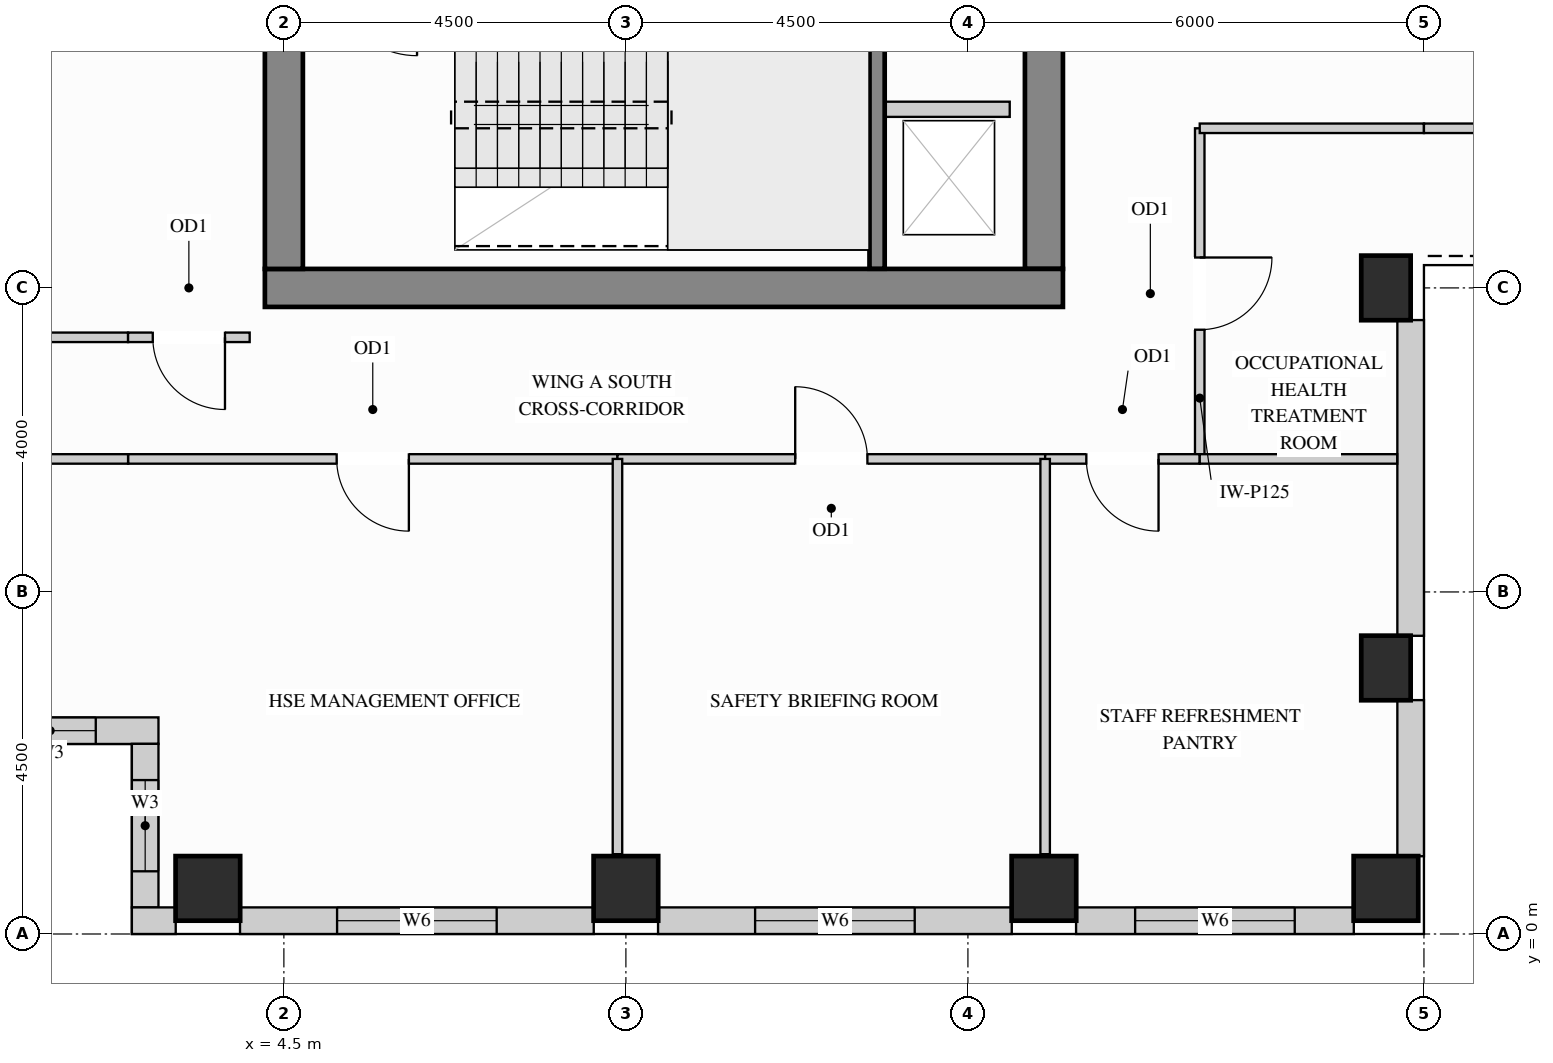
"""IFC4 building model, lengths in metres.
Left out: names, types, materials, properties, quantities, classifications, styles, units other than length and angle.
Written with IfcOpenShell. Run it as: python <this file> out.ifc"""

import sys

from ifc_helpers import new_model, si_unit, direction, frame, frame_2d, origin, origin_2d, place, context, subcontext, project, spatial, rectangle, extrude, source, transform, mapped, element, fill, save


model = new_model("IFC4")
c1 = context("Model", 3, precision=1e-05, world=origin(), true_north=direction((0.0, 1.0)))
c2 = subcontext(c1, "Body", "Model", "MODEL_VIEW")
j1 = project(units=[si_unit("LENGTHUNIT", "METRE"), si_unit("PLANEANGLEUNIT", "RADIAN")], contexts=[c1])
p1 = place(None, origin())
s1 = spatial("IfcSite", under=j1, at=p1, CompositionType="ELEMENT")
p2 = place(p1, origin())
s2 = spatial("IfcBuilding", under=s1, at=p2, CompositionType="ELEMENT")
p3 = place(p2, frame((0.0, 0.0, 248.4)))
s3 = spatial("IfcBuildingStorey", under=s2, at=p3, CompositionType="ELEMENT", Elevation=248.4)
m1 = source(origin(), c2, "Body", "SweptSolid", [
    extrude(rectangle(XDim=0.65, YDim=0.85, at=origin_2d()), origin(), (0.0, 0.0, 1.0), 3.4),
])
for number, where, z_axis, x_axis in (
    (1, (19.0, 3.5, 0.0), (0.0, 0.0, 1.0), (1.0, 0.0, 0.0)),
    (2, (19.0, 8.5, 0.0), (0.0, 0.0, 1.0), (1.0, 0.0, 0.0)),
):
    element("IfcColumn", number, at=place(p3, frame(where, z_axis=z_axis, x_axis=x_axis)), inside=s3, PredefinedType="COLUMN", context=c2, shape_type="MappedRepresentation", body=[
        mapped(m1, transform((0.0, 0.0, 0.0), x_axis=(1.0, 0.0, 0.0), y_axis=(0.0, 1.0, 0.0), z_axis=(0.0, 0.0, 1.0))),
    ])
m2 = source(origin(), c2, "Body", "SweptSolid", [
    extrude(rectangle(XDim=0.85, YDim=0.85, at=origin_2d()), origin(), (0.0, 0.0, 1.0), 3.4),
])
for number, where, z_axis, x_axis in (
    (3, (14.5, 0.6, 0.0), (0.0, 0.0, 1.0), (1.0, 0.0, 0.0)),
    (4, (19.0, 0.6, 0.0), (0.0, 0.0, 1.0), (1.0, 0.0, 0.0)),
    (5, (3.5, 0.6, 0.0), (0.0, 0.0, 1.0), (1.0, 0.0, 0.0)),
    (6, (9.0, 0.6, 0.0), (0.0, 0.0, 1.0), (1.0, 0.0, 0.0)),
):
    element("IfcColumn", number, at=place(p3, frame(where, z_axis=z_axis, x_axis=x_axis)), inside=s3, PredefinedType="COLUMN", context=c2, shape_type="MappedRepresentation", body=[
        mapped(m2, transform((0.0, 0.0, 0.0), x_axis=(1.0, 0.0, 0.0), y_axis=(0.0, 1.0, 0.0), z_axis=(0.0, 0.0, 1.0))),
    ])
m3 = source(origin(), c2, "Body", "SweptSolid", [
    extrude(rectangle(XDim=10.07, YDim=0.5, at=frame_2d((5.035, 0.0))), origin(), (0.0, 0.0, 1.0), 3.4),
])
p4 = place(p3, frame((14.5, 8.75, 0.0), z_axis=(0.0, 0.0, 1.0), x_axis=(0.0, 1.0, 0.0)))
e7 = element("IfcWall", 7, at=p4, inside=s3, PredefinedType="SHEAR", context=c2, shape_type="MappedRepresentation", body=[
    mapped(m3, transform((0.0, 0.0, 0.0), x_axis=(1.0, 0.0, 0.0), y_axis=(0.0, 1.0, 0.0), z_axis=(0.0, 0.0, 1.0))),
])
m4 = source(origin(), c2, "Body", "SweptSolid", [
    extrude(rectangle(XDim=10.5, YDim=0.5, at=frame_2d((5.25, 0.0))), origin(), (0.0, 0.0, 1.0), 3.4),
])
p5 = place(p3, frame((4.25, 8.5, 0.0), z_axis=(0.0, 0.0, 1.0), x_axis=(1.0, 0.0, 0.0)))
e8 = element("IfcWall", 8, at=p5, inside=s3, PredefinedType="SHEAR", context=c2, shape_type="MappedRepresentation", body=[
    mapped(m4, transform((0.0, 0.0, 0.0), x_axis=(1.0, 0.0, 0.0), y_axis=(0.0, 1.0, 0.0), z_axis=(0.0, 0.0, 1.0))),
])
m5 = source(origin(), c2, "Body", "SweptSolid", [
    extrude(rectangle(XDim=20.5, YDim=0.5, at=frame_2d((10.25, 0.0))), origin(), (0.0, 0.0, 1.0), 3.4),
])
p6 = place(p3, frame((4.5, 8.75, 0.0), z_axis=(0.0, 0.0, 1.0), x_axis=(0.0, 1.0, 0.0)))
e9 = element("IfcWall", 9, at=p6, inside=s3, PredefinedType="SHEAR", context=c2, shape_type="MappedRepresentation", body=[
    mapped(m5, transform((0.0, 0.0, 0.0), x_axis=(1.0, 0.0, 0.0), y_axis=(0.0, 1.0, 0.0), z_axis=(0.0, 0.0, 1.0))),
])
p7 = place(p3, frame((0.0, 2.675, 0.0), z_axis=(0.0, 0.0, 1.0), x_axis=(1.0, 0.0, 0.0)))
e10 = element("IfcWall", 10, at=p7, inside=s3, PredefinedType="SOLIDWALL", context=c2, shape_type="SweptSolid", body=[
    extrude(rectangle(XDim=2.85, YDim=0.35, at=frame_2d((1.425, 0.0))), origin(), (0.0, 0.0, 1.0), 3.385),
])
p8 = place(p7, frame((0.825, 0.0, 0.78)))
e11 = element("IfcOpeningElement", 11, at=p8, cuts=e10, PredefinedType="OPENING", context=c2, shape_type="SweptSolid", body=[
    extrude(rectangle(XDim=1.2, YDim=2.25, at=frame_2d((0.6, 1.125))), frame((0.0, 0.185, 0.0), z_axis=(0.0, -1.0, 0.0), x_axis=(1.0, 0.0, 0.0)), (0.0, 0.0, 1.0), 0.37),
])
p9 = place(p3, frame((2.675, 2.502, 0.0), z_axis=(0.0, 0.0, 1.0), x_axis=(0.0, -1.0, 0.0)))
e12 = element("IfcWall", 12, at=p9, inside=s3, PredefinedType="SOLIDWALL", context=c2, shape_type="SweptSolid", body=[
    extrude(rectangle(XDim=2.154, YDim=0.35, at=frame_2d((1.077, 0.0))), origin(), (0.0, 0.0, 1.0), 3.385),
])
p10 = place(p9, frame((0.477, 0.0, 0.78)))
e13 = element("IfcOpeningElement", 13, at=p10, cuts=e12, PredefinedType="OPENING", context=c2, shape_type="SweptSolid", body=[
    extrude(rectangle(XDim=1.2, YDim=2.25, at=frame_2d((0.6, 1.125))), frame((0.0, 0.185, 0.0), z_axis=(0.0, -1.0, 0.0), x_axis=(1.0, 0.0, 0.0)), (0.0, 0.0, 1.0), 0.37),
])
m6 = source(origin(), c2, "Body", "SweptSolid", [
    extrude(rectangle(XDim=0.577, YDim=0.35, at=frame_2d((0.289, 0.0))), origin(), (0.0, 0.0, 1.0), 3.385),
])
p11 = place(p3, frame((2.5, 0.175, 0.0), z_axis=(0.0, 0.0, 1.0), x_axis=(1.0, 0.0, 0.0)))
e14 = element("IfcWall", 14, at=p11, inside=s3, PredefinedType="SOLIDWALL", context=c2, shape_type="MappedRepresentation", body=[
    mapped(m6, transform((0.0, 0.0, 0.0), x_axis=(1.0, 0.0, 0.0), y_axis=(0.0, 1.0, 0.0), z_axis=(0.0, 0.0, 1.0))),
])
p12 = place(p3, frame((3.923, 0.175, 0.0), z_axis=(0.0, 0.0, 1.0), x_axis=(1.0, 0.0, 0.0)))
e15 = element("IfcWall", 15, at=p12, inside=s3, PredefinedType="SOLIDWALL", context=c2, shape_type="SweptSolid", body=[
    extrude(rectangle(XDim=4.654, YDim=0.35, at=frame_2d((2.327, 0.0))), origin(), (0.0, 0.0, 1.0), 3.385),
])
p13 = place(p12, frame((1.277, 0.0, 0.78)))
e16 = element("IfcOpeningElement", 16, at=p13, cuts=e15, PredefinedType="OPENING", context=c2, shape_type="SweptSolid", body=[
    extrude(rectangle(XDim=2.1, YDim=2.25, at=frame_2d((1.05, 1.125))), frame((0.0, 0.185, 0.0), z_axis=(0.0, -1.0, 0.0), x_axis=(1.0, 0.0, 0.0)), (0.0, 0.0, 1.0), 0.37),
])
p14 = place(p3, frame((9.423, 0.175, 0.0), z_axis=(0.0, 0.0, 1.0), x_axis=(1.0, 0.0, 0.0)))
e17 = element("IfcWall", 17, at=p14, inside=s3, PredefinedType="SOLIDWALL", context=c2, shape_type="SweptSolid", body=[
    extrude(rectangle(XDim=4.654, YDim=0.35, at=frame_2d((2.327, 0.0))), origin(), (0.0, 0.0, 1.0), 3.385),
])
p15 = place(p14, frame((1.277, 0.0, 0.78)))
e18 = element("IfcOpeningElement", 18, at=p15, cuts=e17, PredefinedType="OPENING", context=c2, shape_type="SweptSolid", body=[
    extrude(rectangle(XDim=2.1, YDim=2.25, at=frame_2d((1.05, 1.125))), frame((0.0, 0.185, 0.0), z_axis=(0.0, -1.0, 0.0), x_axis=(1.0, 0.0, 0.0)), (0.0, 0.0, 1.0), 0.37),
])
p16 = place(p3, frame((14.923, 0.175, 0.0), z_axis=(0.0, 0.0, 1.0), x_axis=(1.0, 0.0, 0.0)))
e19 = element("IfcWall", 19, at=p16, inside=s3, PredefinedType="SOLIDWALL", context=c2, shape_type="SweptSolid", body=[
    extrude(rectangle(XDim=3.654, YDim=0.35, at=frame_2d((1.827, 0.0))), origin(), (0.0, 0.0, 1.0), 3.385),
])
p17 = place(p16, frame((0.777, 0.0, 0.78)))
e20 = element("IfcOpeningElement", 20, at=p17, cuts=e19, PredefinedType="OPENING", context=c2, shape_type="SweptSolid", body=[
    extrude(rectangle(XDim=2.1, YDim=2.25, at=frame_2d((1.05, 1.125))), frame((0.0, 0.185, 0.0), z_axis=(0.0, -1.0, 0.0), x_axis=(1.0, 0.0, 0.0)), (0.0, 0.0, 1.0), 0.37),
])
m7 = source(origin(), c2, "Body", "SweptSolid", [
    extrude(rectangle(XDim=2.054, YDim=0.35, at=frame_2d((1.027, 0.0))), origin(), (0.0, 0.0, 1.0), 2.619),
])
p18 = place(p3, frame((19.325, 1.023, 0.0), z_axis=(0.0, 0.0, 1.0), x_axis=(0.0, 1.0, 0.0)))
e21 = element("IfcWall", 21, at=p18, inside=s3, PredefinedType="SOLIDWALL", context=c2, shape_type="MappedRepresentation", body=[
    mapped(m7, transform((0.0, 0.0, 0.0), x_axis=(1.0, 0.0, 0.0), y_axis=(0.0, 1.0, 0.0), z_axis=(0.0, 0.0, 1.0))),
])
m8 = source(origin(), c2, "Body", "SweptSolid", [
    extrude(rectangle(XDim=4.154, YDim=0.35, at=frame_2d((2.077, 0.0))), origin(), (0.0, 0.0, 1.0), 2.619),
])
p19 = place(p3, frame((19.325, 3.923, 0.0), z_axis=(0.0, 0.0, 1.0), x_axis=(0.0, 1.0, 0.0)))
e22 = element("IfcWall", 22, at=p19, inside=s3, PredefinedType="SOLIDWALL", context=c2, shape_type="MappedRepresentation", body=[
    mapped(m8, transform((0.0, 0.0, 0.0), x_axis=(1.0, 0.0, 0.0), y_axis=(0.0, 1.0, 0.0), z_axis=(0.0, 0.0, 1.0))),
])
p20 = place(p3, frame((16.55, 6.25, 0.0), z_axis=(0.0, 0.0, 1.0), x_axis=(0.0, 1.0, 0.0)))
e23 = element("IfcWall", 23, at=p20, inside=s3, PredefinedType="PARTITIONING", context=c2, shape_type="SweptSolid", body=[
    extrude(rectangle(XDim=4.35, YDim=0.125, at=frame_2d((2.175, 0.0))), origin(), (0.0, 0.0, 1.0), 3.385),
])
p21 = place(p20, frame((1.7, 0.0, 0.0)))
e24 = element("IfcOpeningElement", 24, at=p21, cuts=e23, PredefinedType="OPENING", context=c2, shape_type="SweptSolid", body=[
    extrude(rectangle(XDim=0.95, YDim=2.15, at=frame_2d((0.475, 1.075))), frame((0.0, 0.073, 0.0), z_axis=(0.0, -1.0, 0.0), x_axis=(1.0, 0.0, 0.0)), (0.0, 0.0, 1.0), 0.145),
])
m9 = source(origin(), c2, "Body", "SweptSolid", [
    extrude(rectangle(XDim=2.098, YDim=0.125, at=frame_2d((1.049, 0.0))), origin(), (0.0, 0.0, 1.0), 3.385),
])
p22 = place(p3, frame((0.352, 7.85, 0.0), z_axis=(0.0, 0.0, 1.0), x_axis=(1.0, 0.0, 0.0)))
e25 = element("IfcWall", 25, at=p22, inside=s3, PredefinedType="PARTITIONING", context=c2, shape_type="MappedRepresentation", body=[
    mapped(m9, transform((0.0, 0.0, 0.0), x_axis=(1.0, 0.0, 0.0), y_axis=(0.0, 1.0, 0.0), z_axis=(0.0, 0.0, 1.0))),
])
p23 = place(p3, frame((2.45, 7.85, 0.0), z_axis=(0.0, 0.0, 1.0), x_axis=(1.0, 0.0, 0.0)))
e26 = element("IfcWall", 26, at=p23, inside=s3, PredefinedType="PARTITIONING", context=c2, shape_type="SweptSolid", body=[
    extrude(rectangle(XDim=1.6, YDim=0.125, at=frame_2d((0.8, 0.0))), origin(), (0.0, 0.0, 1.0), 3.385),
])
p24 = place(p23, frame((0.325, 0.0, 0.0)))
e27 = element("IfcOpeningElement", 27, at=p24, cuts=e26, PredefinedType="OPENING", context=c2, shape_type="SweptSolid", body=[
    extrude(rectangle(XDim=0.95, YDim=2.15, at=frame_2d((0.475, 1.075))), frame((0.0, 0.073, 0.0), z_axis=(0.0, -1.0, 0.0), x_axis=(1.0, 0.0, 0.0)), (0.0, 0.0, 1.0), 0.145),
])
m10 = source(origin(), c2, "Body", "SweptSolid", [
    extrude(rectangle(XDim=2.95, YDim=0.125, at=frame_2d((1.475, 0.0))), origin(), (0.0, 0.0, 1.0), 3.385),
])
p25 = place(p3, frame((16.55, 10.6, 0.0), z_axis=(0.0, 0.0, 1.0), x_axis=(1.0, 0.0, 0.0)))
e28 = element("IfcWall", 28, at=p25, inside=s3, PredefinedType="PARTITIONING", context=c2, shape_type="MappedRepresentation", body=[
    mapped(m10, transform((0.0, 0.0, 0.0), x_axis=(1.0, 0.0, 0.0), y_axis=(0.0, 1.0, 0.0), z_axis=(0.0, 0.0, 1.0))),
])
p26 = place(p3, frame((19.5, 10.6, 0.0), z_axis=(0.0, 0.0, 1.0), x_axis=(1.0, 0.0, 0.0)))
e29 = element("IfcWall", 29, at=p26, inside=s3, PredefinedType="PARTITIONING", context=c2, shape_type="SweptSolid", body=[
    extrude(rectangle(XDim=7.45, YDim=0.125, at=frame_2d((3.725, 0.0))), origin(), (0.0, 0.0, 1.0), 3.385),
])
p27 = place(p26, frame((2.022, 0.0, 0.0)))
e30 = element("IfcOpeningElement", 30, at=p27, cuts=e29, PredefinedType="OPENING", context=c2, shape_type="SweptSolid", body=[
    extrude(rectangle(XDim=0.95, YDim=2.15, at=frame_2d((0.475, 1.075))), frame((0.0, 0.073, 0.0), z_axis=(0.0, -1.0, 0.0), x_axis=(1.0, 0.0, 0.0)), (0.0, 0.0, 1.0), 0.145),
])
p28 = place(p3, frame((2.45, 6.25, 0.0), z_axis=(0.0, 0.0, 1.0), x_axis=(1.0, 0.0, 0.0)))
e31 = element("IfcWall", 31, at=p28, inside=s3, PredefinedType="PARTITIONING", context=c2, shape_type="SweptSolid", body=[
    extrude(rectangle(XDim=6.439, YDim=0.125, at=frame_2d((3.219, 0.0))), origin(), (0.0, 0.0, 1.0), 2.848),
])
p29 = place(p28, frame((2.744, 0.0, 0.0)))
e32 = element("IfcOpeningElement", 32, at=p29, cuts=e31, PredefinedType="OPENING", context=c2, shape_type="SweptSolid", body=[
    extrude(rectangle(XDim=0.95, YDim=2.15, at=frame_2d((0.475, 1.075))), frame((0.0, 0.073, 0.0), z_axis=(0.0, -1.0, 0.0), x_axis=(1.0, 0.0, 0.0)), (0.0, 0.0, 1.0), 0.145),
])
p30 = place(p3, frame((8.889, 6.25, 0.0), z_axis=(0.0, 0.0, 1.0), x_axis=(1.0, 0.0, 0.0)))
e33 = element("IfcWall", 33, at=p30, inside=s3, PredefinedType="PARTITIONING", context=c2, shape_type="SweptSolid", body=[
    extrude(rectangle(XDim=5.627, YDim=0.125, at=frame_2d((2.813, 0.0))), origin(), (0.0, 0.0, 1.0), 2.848),
])
p31 = place(p30, frame((2.338, 0.0, 0.0)))
e34 = element("IfcOpeningElement", 34, at=p31, cuts=e33, PredefinedType="OPENING", context=c2, shape_type="SweptSolid", body=[
    extrude(rectangle(XDim=0.95, YDim=2.15, at=frame_2d((0.475, 1.075))), frame((0.0, 0.073, 0.0), z_axis=(0.0, -1.0, 0.0), x_axis=(1.0, 0.0, 0.0)), (0.0, 0.0, 1.0), 0.145),
])
p32 = place(p3, frame((14.516, 6.25, 0.0), z_axis=(0.0, 0.0, 1.0), x_axis=(1.0, 0.0, 0.0)))
e35 = element("IfcWall", 35, at=p32, inside=s3, PredefinedType="PARTITIONING", context=c2, shape_type="SweptSolid", body=[
    extrude(rectangle(XDim=2.034, YDim=0.125, at=frame_2d((1.017, 0.0))), origin(), (0.0, 0.0, 1.0), 2.848),
])
p33 = place(p32, frame((0.542, 0.0, 0.0)))
e36 = element("IfcOpeningElement", 36, at=p33, cuts=e35, PredefinedType="OPENING", context=c2, shape_type="SweptSolid", body=[
    extrude(rectangle(XDim=0.95, YDim=2.15, at=frame_2d((0.475, 1.075))), frame((0.0, 0.073, 0.0), z_axis=(0.0, -1.0, 0.0), x_axis=(1.0, 0.0, 0.0)), (0.0, 0.0, 1.0), 0.145),
])
m11 = source(origin(), c2, "Body", "SweptSolid", [
    extrude(rectangle(XDim=2.098, YDim=0.125, at=frame_2d((1.049, 0.0))), origin(), (0.0, 0.0, 1.0), 2.848),
])
p34 = place(p3, frame((0.352, 6.25, 0.0), z_axis=(0.0, 0.0, 1.0), x_axis=(1.0, 0.0, 0.0)))
e37 = element("IfcWall", 37, at=p34, inside=s3, PredefinedType="PARTITIONING", context=c2, shape_type="MappedRepresentation", body=[
    mapped(m11, transform((0.0, 0.0, 0.0), x_axis=(1.0, 0.0, 0.0), y_axis=(0.0, 1.0, 0.0), z_axis=(0.0, 0.0, 1.0))),
])
m12 = source(origin(), c2, "Body", "SweptSolid", [
    extrude(rectangle(XDim=2.598, YDim=0.125, at=frame_2d((1.299, 0.0))), origin(), (0.0, 0.0, 1.0), 2.848),
])
p35 = place(p3, frame((16.55, 6.25, 0.0), z_axis=(0.0, 0.0, 1.0), x_axis=(1.0, 0.0, 0.0)))
e38 = element("IfcWall", 38, at=p35, inside=s3, PredefinedType="PARTITIONING", context=c2, shape_type="MappedRepresentation", body=[
    mapped(m12, transform((0.0, 0.0, 0.0), x_axis=(1.0, 0.0, 0.0), y_axis=(0.0, 1.0, 0.0), z_axis=(0.0, 0.0, 1.0))),
])
m13 = source(origin(), c2, "Body", "SweptSolid", [
    extrude(rectangle(XDim=5.2, YDim=0.125, at=frame_2d((2.6, 0.0))), origin(), (0.0, 0.0, 1.0), 3.385),
])
for number, where, z_axis, x_axis in (
    (39, (8.889, 1.05, 0.0), (0.0, 0.0, 1.0), (0.0, 1.0, 0.0)),
    (40, (14.516, 1.05, 0.0), (0.0, 0.0, 1.0), (0.0, 1.0, 0.0)),
):
    element("IfcWall", number, at=place(p3, frame(where, z_axis=z_axis, x_axis=x_axis)), inside=s3, PredefinedType="PARTITIONING", context=c2, shape_type="MappedRepresentation", body=[
        mapped(m13, transform((0.0, 0.0, 0.0), x_axis=(1.0, 0.0, 0.0), y_axis=(0.0, 1.0, 0.0), z_axis=(0.0, 0.0, 1.0))),
    ])
m14 = source(origin(), c2, "Body", "SweptSolid", [
    extrude(rectangle(XDim=1.63, YDim=0.2, at=frame_2d((0.815, 0.0))), origin(), (0.0, 0.0, 1.0), 3.385),
])
p36 = place(p3, frame((12.42, 10.85, 0.0), z_axis=(0.0, 0.0, 1.0), x_axis=(1.0, 0.0, 0.0)))
e41 = element("IfcWall", 41, at=p36, inside=s3, PredefinedType="PARTITIONING", context=c2, shape_type="MappedRepresentation", body=[
    mapped(m14, transform((0.0, 0.0, 0.0), x_axis=(1.0, 0.0, 0.0), y_axis=(0.0, 1.0, 0.0), z_axis=(0.0, 0.0, 1.0))),
])
m15 = source(origin(), c2, "Body", "SweptSolid", [
    extrude(rectangle(XDim=3.803, YDim=0.2, at=frame_2d((1.901, 0.0))), origin(), (0.0, 0.0, 1.0), 3.4),
])
p37 = place(p3, frame((12.305, 8.752, 0.0), z_axis=(0.0, 0.0, 1.0), x_axis=(0.0, 1.0, 0.0)))
e42 = element("IfcWall", 42, at=p37, inside=s3, PredefinedType="SHEAR", context=c2, shape_type="MappedRepresentation", body=[
    mapped(m15, transform((0.0, 0.0, 0.0), x_axis=(1.0, 0.0, 0.0), y_axis=(0.0, 1.0, 0.0), z_axis=(0.0, 0.0, 1.0))),
])
m16 = source(origin(), c2, "Body", "SweptSolid", [
    extrude(rectangle(XDim=0.95, YDim=2.15, at=frame_2d((0.475, 1.075))), frame((0.0, 0.025, 0.0), z_axis=(0.0, -1.0, 0.0), x_axis=(1.0, 0.0, 0.0)), (0.0, 0.0, 1.0), 0.05),
])
p38 = place(p21, origin())
e43 = element("IfcDoor", 43, at=p38, inside=s3, OperationType="SINGLE_SWING_RIGHT", PredefinedType="DOOR", context=c2, shape_type="MappedRepresentation", body=[
    mapped(m16, transform((0.0, 0.0, 0.0), x_axis=(1.0, 0.0, 0.0), y_axis=(0.0, 1.0, 0.0), z_axis=(0.0, 0.0, 1.0))),
])
fill(e24, e43)
p39 = place(p29, origin())
e44 = element("IfcDoor", 44, at=p39, inside=s3, OperationType="SINGLE_SWING_RIGHT", PredefinedType="DOOR", context=c2, shape_type="MappedRepresentation", body=[
    mapped(m16, transform((0.0, 0.0, 0.0), x_axis=(1.0, 0.0, 0.0), y_axis=(0.0, 1.0, 0.0), z_axis=(0.0, 0.0, 1.0))),
])
fill(e32, e44)
p40 = place(p31, origin())
e45 = element("IfcDoor", 45, at=p40, inside=s3, OperationType="SINGLE_SWING_LEFT", PredefinedType="DOOR", context=c2, shape_type="MappedRepresentation", body=[
    mapped(m16, transform((0.0, 0.0, 0.0), x_axis=(1.0, 0.0, 0.0), y_axis=(0.0, 1.0, 0.0), z_axis=(0.0, 0.0, 1.0))),
])
fill(e34, e45)
p41 = place(p33, origin())
e46 = element("IfcDoor", 46, at=p41, inside=s3, OperationType="SINGLE_SWING_RIGHT", PredefinedType="DOOR", context=c2, shape_type="MappedRepresentation", body=[
    mapped(m16, transform((0.0, 0.0, 0.0), x_axis=(1.0, 0.0, 0.0), y_axis=(0.0, 1.0, 0.0), z_axis=(0.0, 0.0, 1.0))),
])
fill(e36, e46)
p42 = place(p24, origin())
e47 = element("IfcDoor", 47, at=p42, inside=s3, OperationType="SINGLE_SWING_RIGHT", PredefinedType="DOOR", context=c2, shape_type="MappedRepresentation", body=[
    mapped(m16, transform((0.0, 0.0, 0.0), x_axis=(1.0, 0.0, 0.0), y_axis=(0.0, 1.0, 0.0), z_axis=(0.0, 0.0, 1.0))),
])
fill(e27, e47)
m17 = source(origin(), c2, "Body", "SweptSolid", [
    extrude(rectangle(XDim=1.2, YDim=2.25, at=frame_2d((0.6, 1.125))), frame((0.0, 0.03, 0.0), z_axis=(0.0, -1.0, 0.0), x_axis=(1.0, 0.0, 0.0)), (0.0, 0.0, 1.0), 0.06),
])
p43 = place(p8, origin())
e48 = element("IfcWindow", 48, at=p43, inside=s3, PartitioningType="SINGLE_PANEL", PredefinedType="WINDOW", context=c2, shape_type="MappedRepresentation", body=[
    mapped(m17, transform((0.0, 0.0, 0.0), x_axis=(1.0, 0.0, 0.0), y_axis=(0.0, 1.0, 0.0), z_axis=(0.0, 0.0, 1.0))),
])
fill(e11, e48)
p44 = place(p10, origin())
e49 = element("IfcWindow", 49, at=p44, inside=s3, PartitioningType="SINGLE_PANEL", PredefinedType="WINDOW", context=c2, shape_type="MappedRepresentation", body=[
    mapped(m17, transform((0.0, 0.0, 0.0), x_axis=(1.0, 0.0, 0.0), y_axis=(0.0, 1.0, 0.0), z_axis=(0.0, 0.0, 1.0))),
])
fill(e13, e49)
m18 = source(origin(), c2, "Body", "SweptSolid", [
    extrude(rectangle(XDim=2.1, YDim=2.25, at=frame_2d((1.05, 1.125))), frame((0.0, 0.03, 0.0), z_axis=(0.0, -1.0, 0.0), x_axis=(1.0, 0.0, 0.0)), (0.0, 0.0, 1.0), 0.06),
])
p45 = place(p13, origin())
e50 = element("IfcWindow", 50, at=p45, inside=s3, PartitioningType="SINGLE_PANEL", PredefinedType="WINDOW", context=c2, shape_type="MappedRepresentation", body=[
    mapped(m18, transform((0.0, 0.0, 0.0), x_axis=(1.0, 0.0, 0.0), y_axis=(0.0, 1.0, 0.0), z_axis=(0.0, 0.0, 1.0))),
])
fill(e16, e50)
p46 = place(p15, origin())
e51 = element("IfcWindow", 51, at=p46, inside=s3, PartitioningType="SINGLE_PANEL", PredefinedType="WINDOW", context=c2, shape_type="MappedRepresentation", body=[
    mapped(m18, transform((0.0, 0.0, 0.0), x_axis=(1.0, 0.0, 0.0), y_axis=(0.0, 1.0, 0.0), z_axis=(0.0, 0.0, 1.0))),
])
fill(e18, e51)
p47 = place(p17, origin())
e52 = element("IfcWindow", 52, at=p47, inside=s3, PartitioningType="SINGLE_PANEL", PredefinedType="WINDOW", context=c2, shape_type="MappedRepresentation", body=[
    mapped(m18, transform((0.0, 0.0, 0.0), x_axis=(1.0, 0.0, 0.0), y_axis=(0.0, 1.0, 0.0), z_axis=(0.0, 0.0, 1.0))),
])
fill(e20, e52)
save(model, sys.argv[1])
